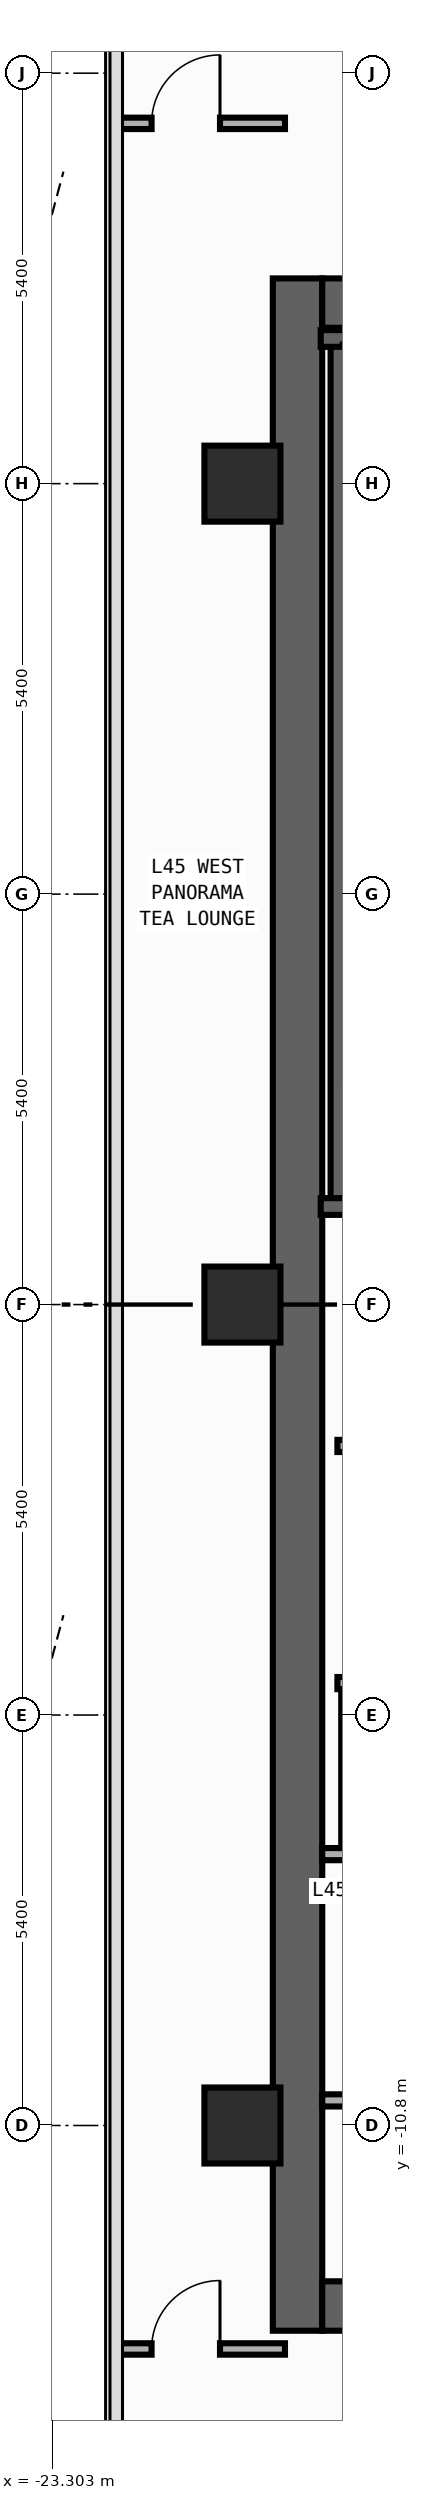
"""IFC4 building model, lengths in metres.
Left out: names, types, materials, properties, quantities, classifications, styles, units other than length and angle.
Written with IfcOpenShell. Run it as: python <this file> out.ifc"""

import sys

from ifc_helpers import new_model, si_unit, direction, frame, frame_2d, origin, origin_2d, place, context, subcontext, project, spatial, rectangle, extrude, element, fill, save


model = new_model("IFC4")
c1 = context("Model", 3, precision=1e-05, world=origin(), true_north=direction((0.0, 1.0)))
c2 = subcontext(c1, "Body", "Model", "MODEL_VIEW")
j1 = project(units=[si_unit("LENGTHUNIT", "METRE"), si_unit("PLANEANGLEUNIT", "RADIAN")], contexts=[c1])
p1 = place(None, origin())
s1 = spatial("IfcSite", under=j1, at=p1, CompositionType="ELEMENT")
p2 = place(p1, origin())
s2 = spatial("IfcBuilding", under=s1, at=p2, CompositionType="ELEMENT")
p3 = place(p2, frame((0.0, 0.0, 195.4)))
s3 = spatial("IfcBuildingStorey", under=s2, at=p3, CompositionType="ELEMENT", Elevation=195.4)
p4 = place(p3, frame((-20.075, -13.5, 0.0), z_axis=(0.0, 0.0, 1.0), x_axis=(0.0, 1.0, 0.0)))
e1 = element("IfcWall", 1, at=p4, inside=s3, PredefinedType="SHEAR", context=c2, shape_type="SweptSolid", body=[
    extrude(rectangle(XDim=27.0, YDim=0.65, at=frame_2d((13.5, 0.0))), origin(), (0.0, 0.0, 1.0), 3.54),
])
for number, where, z_axis, x_axis in (
    (2, (-19.75, -13.175, 0.0), (0.0, 0.0, 1.0), (1.0, 0.0, 0.0)),
    (3, (-19.75, 13.175, 0.0), (0.0, 0.0, 1.0), (1.0, 0.0, 0.0)),
):
    element("IfcWall", number, at=place(p3, frame(where, z_axis=z_axis, x_axis=x_axis)), inside=s3, PredefinedType="SHEAR", context=c2, shape_type="SweptSolid", body=[
        extrude(rectangle(XDim=7.1, YDim=0.65, at=frame_2d((3.55, 0.0))), origin(), (0.0, 0.0, 1.0), 3.54),
    ])
p5 = place(p3, frame((-19.53, 1.29, 0.0), z_axis=(0.0, 0.0, 1.0), x_axis=(0.0, 1.0, 0.0)))
e4 = element("IfcWall", 4, at=p5, inside=s3, PredefinedType="SHEAR", context=c2, shape_type="SweptSolid", body=[
    extrude(rectangle(XDim=11.42, YDim=0.22, at=frame_2d((5.71, 0.0))), origin(), (0.0, 0.0, 1.0), 3.54),
])
p6 = place(p3, frame((-19.77, 12.71, 0.0), z_axis=(0.0, 0.0, 1.0), x_axis=(1.0, 0.0, 0.0)))
e5 = element("IfcWall", 5, at=p6, inside=s3, PredefinedType="SHEAR", context=c2, shape_type="SweptSolid", body=[
    extrude(rectangle(XDim=4.065, YDim=0.22, at=frame_2d((2.032, 0.0))), origin(), (0.0, 0.0, 1.0), 3.54),
])
p7 = place(p3, frame((-19.77, 1.29, 0.0), z_axis=(0.0, 0.0, 1.0), x_axis=(1.0, 0.0, 0.0)))
e6 = element("IfcWall", 6, at=p7, inside=s3, PredefinedType="SHEAR", context=c2, shape_type="SweptSolid", body=[
    extrude(rectangle(XDim=4.065, YDim=0.22, at=frame_2d((2.032, 0.0))), origin(), (0.0, 0.0, 1.0), 3.54),
])
p8 = place(p7, frame((1.08, 0.0, 0.0)))
e7 = element("IfcOpeningElement", 7, at=p8, cuts=e6, PredefinedType="OPENING", context=c2, shape_type="SweptSolid", body=[
    extrude(rectangle(XDim=1.1, YDim=2.2, at=frame_2d((0.55, 1.1))), frame((0.0, 0.12, 0.0), z_axis=(0.0, -1.0, 0.0), x_axis=(1.0, 0.0, 0.0)), (0.0, 0.0, 1.0), 0.24),
])
for number, where, z_axis, x_axis in (
    (8, (-20.8, -10.8, 0.0), (0.0, 0.0, 1.0), (1.0, 0.0, 0.0)),
    (9, (-20.8, 0.0, 0.0), (0.0, 0.0, 1.0), (1.0, 0.0, 0.0)),
    (10, (-20.8, 10.8, 0.0), (0.0, 0.0, 1.0), (1.0, 0.0, 0.0)),
):
    element("IfcColumn", number, at=place(p3, frame(where, z_axis=z_axis, x_axis=x_axis)), inside=s3, PredefinedType="COLUMN", context=c2, shape_type="SweptSolid", body=[
        extrude(rectangle(XDim=1.0, YDim=1.0, at=origin_2d()), origin(), (0.0, 0.0, 1.0), 3.8),
    ])
p9 = place(p3, frame((-19.55, -1.86, 0.0), z_axis=(0.0, 0.0, 1.0), x_axis=(1.0, 0.0, 0.0)))
e11 = element("IfcWall", 11, at=p9, inside=s3, PredefinedType="STANDARD", context=c2, shape_type="SweptSolid", body=[
    extrude(rectangle(XDim=3.8, YDim=0.16, at=frame_2d((1.9, 0.0))), origin(), (0.0, 0.0, 1.0), 3.54),
])
p10 = place(p9, frame((1.18, 0.0, 0.0)))
e12 = element("IfcOpeningElement", 12, at=p10, cuts=e11, PredefinedType="OPENING", context=c2, shape_type="SweptSolid", body=[
    extrude(rectangle(XDim=1.15, YDim=2.2, at=frame_2d((0.575, 1.1))), frame((0.0, 0.09, 0.0), z_axis=(0.0, -1.0, 0.0), x_axis=(1.0, 0.0, 0.0)), (0.0, 0.0, 1.0), 0.18),
])
p11 = place(p3, frame((-19.55, -4.98, 0.0), z_axis=(0.0, 0.0, 1.0), x_axis=(1.0, 0.0, 0.0)))
e13 = element("IfcWall", 13, at=p11, inside=s3, PredefinedType="STANDARD", context=c2, shape_type="SweptSolid", body=[
    extrude(rectangle(XDim=3.8, YDim=0.16, at=frame_2d((1.9, 0.0))), origin(), (0.0, 0.0, 1.0), 3.54),
])
for number, where, z_axis, x_axis in (
    (14, (-19.75, -10.47, 0.0), (0.0, 0.0, 1.0), (1.0, 0.0, 0.0)),
    (15, (-19.75, -7.23, 0.0), (0.0, 0.0, 1.0), (1.0, 0.0, 0.0)),
):
    element("IfcWall", number, at=place(p3, frame(where, z_axis=z_axis, x_axis=x_axis)), inside=s3, PredefinedType="PARTITIONING", context=c2, shape_type="SweptSolid", body=[
        extrude(rectangle(XDim=2.44, YDim=0.16, at=frame_2d((1.22, 0.0))), origin(), (0.0, 0.0, 1.0), 3.54),
    ])
p12 = place(p3, frame((-22.455, 15.54, 0.0), z_axis=(0.0, 0.0, 1.0), x_axis=(1.0, 0.0, 0.0)))
e16 = element("IfcWall", 16, at=p12, inside=s3, PredefinedType="PARTITIONING", context=c2, shape_type="SweptSolid", body=[
    extrude(rectangle(XDim=2.215, YDim=0.15, at=frame_2d((1.107, 0.0))), origin(), (0.0, 0.0, 1.0), 3.54),
])
p13 = place(p12, frame((0.46, 0.0, 0.0)))
e17 = element("IfcOpeningElement", 17, at=p13, cuts=e16, PredefinedType="OPENING", context=c2, shape_type="SweptSolid", body=[
    extrude(rectangle(XDim=0.9, YDim=2.15, at=frame_2d((0.45, 1.075))), frame((0.0, 0.085, 0.0), z_axis=(0.0, -1.0, 0.0), x_axis=(1.0, 0.0, 0.0)), (0.0, 0.0, 1.0), 0.17),
])
p14 = place(p3, frame((-22.455, -13.74, 0.0), z_axis=(0.0, 0.0, 1.0), x_axis=(1.0, 0.0, 0.0)))
e18 = element("IfcWall", 18, at=p14, inside=s3, PredefinedType="PARTITIONING", context=c2, shape_type="SweptSolid", body=[
    extrude(rectangle(XDim=2.215, YDim=0.15, at=frame_2d((1.107, 0.0))), origin(), (0.0, 0.0, 1.0), 3.54),
])
p15 = place(p14, frame((0.46, 0.0, 0.0)))
e19 = element("IfcOpeningElement", 19, at=p15, cuts=e18, PredefinedType="OPENING", context=c2, shape_type="SweptSolid", body=[
    extrude(rectangle(XDim=0.9, YDim=2.15, at=frame_2d((0.45, 1.075))), frame((0.0, 0.085, 0.0), z_axis=(0.0, -1.0, 0.0), x_axis=(1.0, 0.0, 0.0)), (0.0, 0.0, 1.0), 0.17),
])
p16 = place(p3, frame((-19.45, -7.15, 0.0), z_axis=(0.0, 0.0, 1.0), x_axis=(0.0, 1.0, 0.0)))
e20 = element("IfcWall", 20, at=p16, inside=s3, PredefinedType="PARTITIONING", context=c2, shape_type="SweptSolid", body=[
    extrude(rectangle(XDim=2.09, YDim=0.1, at=frame_2d((1.045, 0.0))), origin(), (0.0, 0.0, 1.0), 3.54),
])
p17 = place(p13, origin())
e21 = element("IfcDoor", 21, at=p17, inside=s3, OperationType="SINGLE_SWING_RIGHT", PredefinedType="DOOR", context=c2, shape_type="SweptSolid", body=[
    extrude(rectangle(XDim=0.9, YDim=2.15, at=frame_2d((0.45, 1.075))), frame((0.0, 0.025, 0.0), z_axis=(0.0, -1.0, 0.0), x_axis=(1.0, 0.0, 0.0)), (0.0, 0.0, 1.0), 0.05),
])
fill(e17, e21)
p18 = place(p15, origin())
e22 = element("IfcDoor", 22, at=p18, inside=s3, OperationType="SINGLE_SWING_RIGHT", PredefinedType="DOOR", context=c2, shape_type="SweptSolid", body=[
    extrude(rectangle(XDim=0.9, YDim=2.15, at=frame_2d((0.45, 1.075))), frame((0.0, 0.025, 0.0), z_axis=(0.0, -1.0, 0.0), x_axis=(1.0, 0.0, 0.0)), (0.0, 0.0, 1.0), 0.05),
])
fill(e19, e22)
save(model, sys.argv[1])
